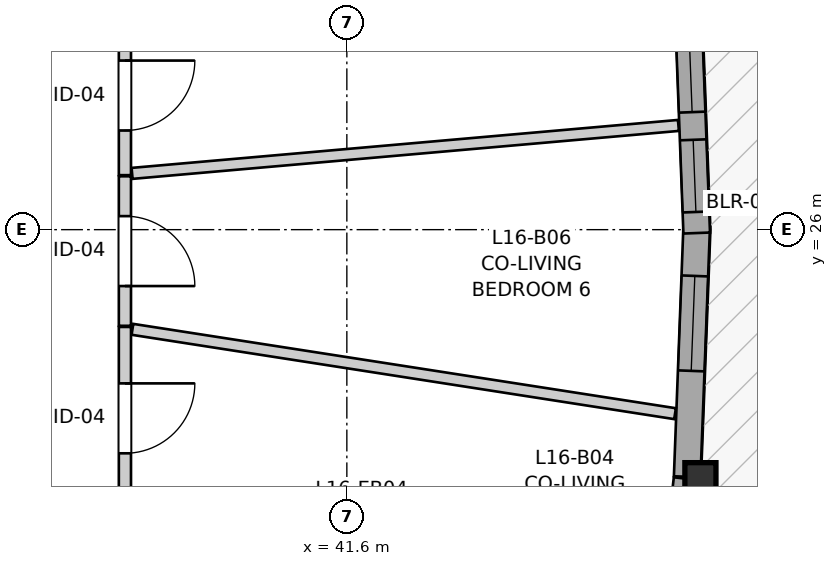
"""IFC4 building model, lengths in metres.
Left out: names, types, materials, properties, quantities, classifications, styles, units other than length and angle.
Written with IfcOpenShell. Run it as: python <this file> out.ifc"""

import sys

from ifc_helpers import new_model, si_unit, direction, frame, frame_2d, origin, origin_2d, place, context, subcontext, project, spatial, rectangle, i_section, extrude, source, transform, mapped, element, fill, save


model = new_model("IFC4")
c1 = context("Model", 3, precision=1e-05, world=origin(), true_north=direction((0.0, 1.0)))
c2 = subcontext(c1, "Body", "Model", "MODEL_VIEW")
j1 = project(units=[si_unit("LENGTHUNIT", "METRE"), si_unit("PLANEANGLEUNIT", "RADIAN")], contexts=[c1])
p1 = place(None, origin())
s1 = spatial("IfcSite", under=j1, at=p1, CompositionType="ELEMENT")
p2 = place(p1, origin())
s2 = spatial("IfcBuilding", under=s1, at=p2, CompositionType="ELEMENT")
p3 = place(p2, frame((0.0, 0.0, 55.8)))
s3 = spatial("IfcBuildingStorey", under=s2, at=p3, CompositionType="ELEMENT", Elevation=55.8)
m1 = source(origin(), c2, "Body", "SweptSolid", [
    extrude(i_section(OverallWidth=0.409, OverallDepth=0.425, WebThickness=0.03, FlangeThickness=0.048, FilletRadius=0.015, at=origin_2d()), origin(), (0.0, 0.0, 1.0), 2.94),
])
p4 = place(p3, frame((46.252, 22.722, 0.0), z_axis=(0.0, 0.0, 1.0), x_axis=(1.0, 0.0, 0.0)))
e1 = element("IfcColumn", 1, at=p4, inside=s3, PredefinedType="PILASTER", context=c2, shape_type="MappedRepresentation", body=[
    mapped(m1, transform((0.0, 0.0, 0.0), x_axis=(1.0, 0.0, 0.0), y_axis=(0.0, 1.0, 0.0), z_axis=(0.0, 0.0, 1.0), scale=1.0)),
])
p5 = place(p3, frame((45.7, 19.426, 0.0), z_axis=(0.0, 0.0, 1.0), x_axis=(0.113266370988, 0.993564657787, 0.0)))
e2 = element("IfcWall", 2, at=p5, inside=s3, PredefinedType="SOLIDWALL", context=c2, shape_type="SweptSolid", body=[
    extrude(rectangle(XDim=3.317, YDim=0.35, at=frame_2d((1.659, 0.0))), origin(), (0.0, 0.0, 1.0), 2.42),
])
p6 = place(p5, frame((0.869, 0.0, 0.82)))
e3 = element("IfcOpeningElement", 3, at=p6, cuts=e2, PredefinedType="OPENING", context=c2, shape_type="SweptSolid", body=[
    extrude(rectangle(XDim=1.6, YDim=1.35, at=frame_2d((0.8, 0.675))), frame((0.0, 0.185, 0.0), z_axis=(0.0, -1.0, 0.0), x_axis=(1.0, 0.0, 0.0)), (0.0, 0.0, 1.0), 0.37),
])
p7 = place(p3, frame((46.078, 22.749, 0.0), z_axis=(0.0, 0.0, 1.0), x_axis=(0.037972593677, 0.999278780986, 0.0)))
e4 = element("IfcWall", 4, at=p7, inside=s3, PredefinedType="SOLIDWALL", context=c2, shape_type="SweptSolid", body=[
    extrude(rectangle(XDim=3.298, YDim=0.35, at=frame_2d((1.649, 0.0))), origin(), (0.0, 0.0, 1.0), 2.42),
])
p8 = place(p7, frame((1.394, 0.0, 0.82)))
e5 = element("IfcOpeningElement", 5, at=p8, cuts=e4, PredefinedType="OPENING", context=c2, shape_type="SweptSolid", body=[
    extrude(rectangle(XDim=1.25, YDim=1.35, at=frame_2d((0.625, 0.675))), frame((0.0, 0.185, 0.0), z_axis=(0.0, -1.0, 0.0), x_axis=(1.0, 0.0, 0.0)), (0.0, 0.0, 1.0), 0.37),
])
p9 = place(p3, frame((46.203, 25.955, 0.0), z_axis=(0.0, 0.0, 1.0), x_axis=(-0.038016855762, 0.999277098045, 0.0)))
e6 = element("IfcWall", 6, at=p9, inside=s3, PredefinedType="SOLIDWALL", context=c2, shape_type="SweptSolid", body=[
    extrude(rectangle(XDim=3.018, YDim=0.35, at=frame_2d((1.509, 0.0))), origin(), (0.0, 0.0, 1.0), 2.42),
])
p10 = place(p9, frame((0.277, 0.0, 0.82)))
e7 = element("IfcOpeningElement", 7, at=p10, cuts=e6, PredefinedType="OPENING", context=c2, shape_type="SweptSolid", body=[
    extrude(rectangle(XDim=0.95, YDim=1.35, at=frame_2d((0.475, 0.675))), frame((0.0, 0.185, 0.0), z_axis=(0.0, -1.0, 0.0), x_axis=(1.0, 0.0, 0.0)), (0.0, 0.0, 1.0), 0.37),
])
p11 = place(p9, frame((1.592, 0.0, 0.82)))
e8 = element("IfcOpeningElement", 8, at=p11, cuts=e6, PredefinedType="OPENING", context=c2, shape_type="SweptSolid", body=[
    extrude(rectangle(XDim=0.95, YDim=1.35, at=frame_2d((0.475, 0.675))), frame((0.0, 0.185, 0.0), z_axis=(0.0, -1.0, 0.0), x_axis=(1.0, 0.0, 0.0)), (0.0, 0.0, 1.0), 0.37),
])
p12 = place(p3, frame((38.68, 24.72, 0.0), z_axis=(0.0, 0.0, 1.0), x_axis=(0.0, -1.0, 0.0)))
e9 = element("IfcWall", 9, at=p12, inside=s3, PredefinedType="PARTITIONING", context=c2, shape_type="SweptSolid", body=[
    extrude(rectangle(XDim=2.357, YDim=0.16, at=frame_2d((1.178, 0.0))), origin(), (0.0, 0.0, 1.0), 2.94),
])
p13 = place(p12, frame((0.742, 0.0, 0.0)))
e10 = element("IfcOpeningElement", 10, at=p13, cuts=e9, PredefinedType="OPENING", context=c2, shape_type="SweptSolid", body=[
    extrude(rectangle(XDim=0.92, YDim=2.1, at=frame_2d((0.46, 1.05))), frame((0.0, 0.09, 0.0), z_axis=(0.0, -1.0, 0.0), x_axis=(1.0, 0.0, 0.0)), (0.0, 0.0, 1.0), 0.18),
])
p14 = place(p3, frame((38.68, 28.766, 0.0), z_axis=(0.0, 0.0, 1.0), x_axis=(0.0, -1.0, 0.0)))
e11 = element("IfcWall", 11, at=p14, inside=s3, PredefinedType="PARTITIONING", context=c2, shape_type="SweptSolid", body=[
    extrude(rectangle(XDim=2.049, YDim=0.16, at=frame_2d((1.024, 0.0))), origin(), (0.0, 0.0, 1.0), 2.94),
])
p15 = place(p14, frame((0.542, 0.0, 0.0)))
e12 = element("IfcOpeningElement", 12, at=p15, cuts=e11, PredefinedType="OPENING", context=c2, shape_type="SweptSolid", body=[
    extrude(rectangle(XDim=0.92, YDim=2.1, at=frame_2d((0.46, 1.05))), frame((0.0, 0.09, 0.0), z_axis=(0.0, -1.0, 0.0), x_axis=(1.0, 0.0, 0.0)), (0.0, 0.0, 1.0), 0.18),
])
p16 = place(p3, frame((38.68, 26.702, 0.0), z_axis=(0.0, 0.0, 1.0), x_axis=(0.0, -1.0, 0.0)))
e13 = element("IfcWall", 13, at=p16, inside=s3, PredefinedType="PARTITIONING", context=c2, shape_type="SweptSolid", body=[
    extrude(rectangle(XDim=1.967, YDim=0.16, at=frame_2d((0.983, 0.0))), origin(), (0.0, 0.0, 1.0), 2.94),
])
p17 = place(p16, frame((0.524, 0.0, 0.0)))
e14 = element("IfcOpeningElement", 14, at=p17, cuts=e13, PredefinedType="OPENING", context=c2, shape_type="SweptSolid", body=[
    extrude(rectangle(XDim=0.92, YDim=2.1, at=frame_2d((0.46, 1.05))), frame((0.0, 0.09, 0.0), z_axis=(0.0, -1.0, 0.0), x_axis=(1.0, 0.0, 0.0)), (0.0, 0.0, 1.0), 0.18),
])
p18 = place(p3, frame((38.779, 24.689, 0.0), z_axis=(0.0, 0.0, 1.0), x_axis=(0.988134938683, -0.153588225311, 0.0)))
e15 = element("IfcWall", 15, at=p18, inside=s3, PredefinedType="PARTITIONING", context=c2, shape_type="SweptSolid", body=[
    extrude(rectangle(XDim=7.225, YDim=0.145, at=frame_2d((3.612, 0.0))), origin(), (0.0, 0.0, 1.0), 2.94),
])
p19 = place(p3, frame((38.774, 26.74, 0.0), z_axis=(0.0, 0.0, 1.0), x_axis=(0.99617095107, 0.087426747871, 0.0)))
e16 = element("IfcWall", 16, at=p19, inside=s3, PredefinedType="PARTITIONING", context=c2, shape_type="SweptSolid", body=[
    extrude(rectangle(XDim=7.216, YDim=0.145, at=frame_2d((3.608, 0.0))), origin(), (0.0, 0.0, 1.0), 2.94),
])
m2 = source(origin(), c2, "Body", "SweptSolid", [
    extrude(rectangle(XDim=1.25, YDim=1.35, at=frame_2d((0.625, 0.675))), frame((0.0, 0.03, 0.0), z_axis=(0.0, -1.0, 0.0), x_axis=(1.0, 0.0, 0.0)), (0.0, 0.0, 1.0), 0.06),
])
p20 = place(p8, origin())
e17 = element("IfcWindow", 17, at=p20, inside=s3, PartitioningType="SINGLE_PANEL", PredefinedType="WINDOW", context=c2, shape_type="MappedRepresentation", body=[
    mapped(m2, transform((0.0, 0.0, 0.0), x_axis=(1.0, 0.0, 0.0), y_axis=(0.0, 1.0, 0.0), z_axis=(0.0, 0.0, 1.0), scale=1.0)),
])
fill(e5, e17)
m3 = source(origin(), c2, "Body", "SweptSolid", [
    extrude(rectangle(XDim=0.95, YDim=1.35, at=frame_2d((0.475, 0.675))), frame((0.0, 0.03, 0.0), z_axis=(0.0, -1.0, 0.0), x_axis=(1.0, 0.0, 0.0)), (0.0, 0.0, 1.0), 0.06),
])
p21 = place(p10, origin())
e18 = element("IfcWindow", 18, at=p21, inside=s3, PartitioningType="SINGLE_PANEL", PredefinedType="WINDOW", context=c2, shape_type="MappedRepresentation", body=[
    mapped(m3, transform((0.0, 0.0, 0.0), x_axis=(1.0, 0.0, 0.0), y_axis=(0.0, 1.0, 0.0), z_axis=(0.0, 0.0, 1.0), scale=1.0)),
])
fill(e7, e18)
p22 = place(p11, origin())
e19 = element("IfcWindow", 19, at=p22, inside=s3, PartitioningType="SINGLE_PANEL", PredefinedType="WINDOW", context=c2, shape_type="MappedRepresentation", body=[
    mapped(m3, transform((0.0, 0.0, 0.0), x_axis=(1.0, 0.0, 0.0), y_axis=(0.0, 1.0, 0.0), z_axis=(0.0, 0.0, 1.0), scale=1.0)),
])
fill(e8, e19)
m4 = source(origin(), c2, "Body", "SweptSolid", [
    extrude(rectangle(XDim=0.92, YDim=2.1, at=frame_2d((0.46, 1.05))), frame((0.0, 0.025, 0.0), z_axis=(0.0, -1.0, 0.0), x_axis=(1.0, 0.0, 0.0)), (0.0, 0.0, 1.0), 0.05),
])
p23 = place(p13, origin())
e20 = element("IfcDoor", 20, at=p23, inside=s3, OperationType="SINGLE_SWING_LEFT", PredefinedType="DOOR", context=c2, shape_type="MappedRepresentation", body=[
    mapped(m4, transform((0.0, 0.0, 0.0), x_axis=(1.0, 0.0, 0.0), y_axis=(0.0, 1.0, 0.0), z_axis=(0.0, 0.0, 1.0), scale=1.0)),
])
fill(e10, e20)
p24 = place(p15, origin())
e21 = element("IfcDoor", 21, at=p24, inside=s3, OperationType="SINGLE_SWING_LEFT", PredefinedType="DOOR", context=c2, shape_type="MappedRepresentation", body=[
    mapped(m4, transform((0.0, 0.0, 0.0), x_axis=(1.0, 0.0, 0.0), y_axis=(0.0, 1.0, 0.0), z_axis=(0.0, 0.0, 1.0), scale=1.0)),
])
fill(e12, e21)
p25 = place(p17, origin())
e22 = element("IfcDoor", 22, at=p25, inside=s3, OperationType="SINGLE_SWING_RIGHT", PredefinedType="DOOR", context=c2, shape_type="MappedRepresentation", body=[
    mapped(m4, transform((0.0, 0.0, 0.0), x_axis=(1.0, 0.0, 0.0), y_axis=(0.0, 1.0, 0.0), z_axis=(0.0, 0.0, 1.0), scale=1.0)),
])
fill(e14, e22)
save(model, sys.argv[1])
